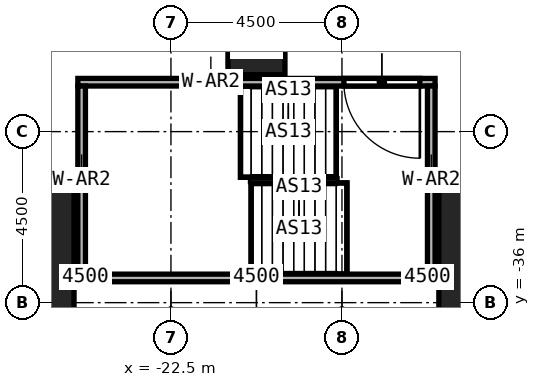
"""IFC4 building model, lengths in metres.
Left out: names, types, materials, properties, quantities, classifications, styles, units other than length and angle.
Written with IfcOpenShell. Run it as: python <this file> out.ifc"""

import sys

from ifc_helpers import new_model, si_unit, direction, frame, frame_2d, origin, origin_2d, place, context, subcontext, project, spatial, rectangle, extrude, element, fill, save


model = new_model("IFC4")
c1 = context("Model", 3, precision=1e-05, world=origin(), true_north=direction((0.0, 1.0)))
c2 = subcontext(c1, "Body", "Model", "MODEL_VIEW")
j1 = project(units=[si_unit("LENGTHUNIT", "METRE"), si_unit("PLANEANGLEUNIT", "RADIAN")], contexts=[c1])
p1 = place(None, origin())
s1 = spatial("IfcSite", under=j1, at=p1, CompositionType="ELEMENT")
p2 = place(p1, origin())
s2 = spatial("IfcBuilding", under=s1, at=p2, CompositionType="ELEMENT")
p3 = place(p2, frame((0.0, 0.0, 19.0)))
s3 = spatial("IfcBuildingStorey", under=s2, at=p3, CompositionType="ELEMENT", Elevation=19.0)
for number, where, z_axis, x_axis in (
    (1, (-27.0, -35.85, 0.0), (0.0, 0.0, 1.0), (1.0, 0.0, 0.0)),
    (2, (-13.5, -35.85, 0.0), (0.0, 0.0, 1.0), (1.0, 0.0, 0.0)),
):
    element("IfcColumn", number, at=place(p3, frame(where, z_axis=z_axis, x_axis=x_axis)), inside=s3, PredefinedType="COLUMN", context=c2, shape_type="SweptSolid", body=[
        extrude(rectangle(XDim=3.9, YDim=6.3, at=origin_2d()), origin(), (0.0, 0.0, 1.0), 6.0),
    ])
p4 = place(p3, frame((-20.25, -29.25, 0.0), z_axis=(0.0, 0.0, 1.0), x_axis=(1.0, 0.0, 0.0)))
e3 = element("IfcColumn", 3, at=p4, inside=s3, PredefinedType="COLUMN", context=c2, shape_type="SweptSolid", body=[
    extrude(rectangle(XDim=1.5, YDim=1.5, at=origin_2d()), origin(), (0.0, 0.0, 1.0), 6.0),
])
p5 = place(p3, frame((-15.55, -30.2, 0.0), z_axis=(0.0, 0.0, 1.0), x_axis=(-1.0, 0.0, 0.0)))
e4 = element("IfcWall", 4, at=p5, inside=s3, PredefinedType="SOLIDWALL", context=c2, shape_type="SweptSolid", body=[
    extrude(rectangle(XDim=9.4, YDim=0.2, at=frame_2d((4.7, 0.0))), origin(), (0.0, 0.0, 1.0), 6.0),
])
p6 = place(p5, frame((0.4, 0.0, 0.0)))
e5 = element("IfcOpeningElement", 5, at=p6, cuts=e4, PredefinedType="OPENING", context=c2, shape_type="SweptSolid", body=[
    extrude(rectangle(XDim=2.0, YDim=2.4, at=frame_2d((1.0, 1.2))), frame((0.0, 0.1, 0.0), z_axis=(0.0, -1.0, 0.0), x_axis=(1.0, 0.0, 0.0)), (0.0, 0.0, 1.0), 0.2),
])
p7 = place(p3, frame((-24.95, -35.35, 0.0), z_axis=(0.0, 0.0, 1.0), x_axis=(1.0, 0.0, 0.0)))
e6 = element("IfcWall", 6, at=p7, inside=s3, PredefinedType="SOLIDWALL", context=c2, shape_type="SweptSolid", body=[
    extrude(rectangle(XDim=9.4, YDim=0.2, at=frame_2d((4.7, 0.0))), origin(), (0.0, 0.0, 1.0), 6.0),
])
for number, where, z_axis, x_axis in (
    (7, (-24.85, -35.25, 0.0), (0.0, 0.0, 1.0), (0.0, 1.0, 0.0)),
    (8, (-15.65, -35.25, 0.0), (0.0, 0.0, 1.0), (0.0, 1.0, 0.0)),
):
    element("IfcWall", number, at=place(p3, frame(where, z_axis=z_axis, x_axis=x_axis)), inside=s3, PredefinedType="SOLIDWALL", context=c2, shape_type="SweptSolid", body=[
        extrude(rectangle(XDim=4.95, YDim=0.2, at=frame_2d((2.475, 0.0))), origin(), (0.0, 0.0, 1.0), 6.0),
    ])
p8 = place(p6, origin())
e9 = element("IfcDoor", 9, at=p8, inside=s3, OperationType="DOUBLE_DOOR_SINGLE_SWING", PredefinedType="DOOR", context=c2, shape_type="SweptSolid", body=[
    extrude(rectangle(XDim=2.0, YDim=2.4, at=frame_2d((1.0, 1.2))), frame((0.0, 0.025, 0.0), z_axis=(0.0, -1.0, 0.0), x_axis=(1.0, 0.0, 0.0)), (0.0, 0.0, 1.0), 0.05),
])
fill(e5, e9)
save(model, sys.argv[1])
